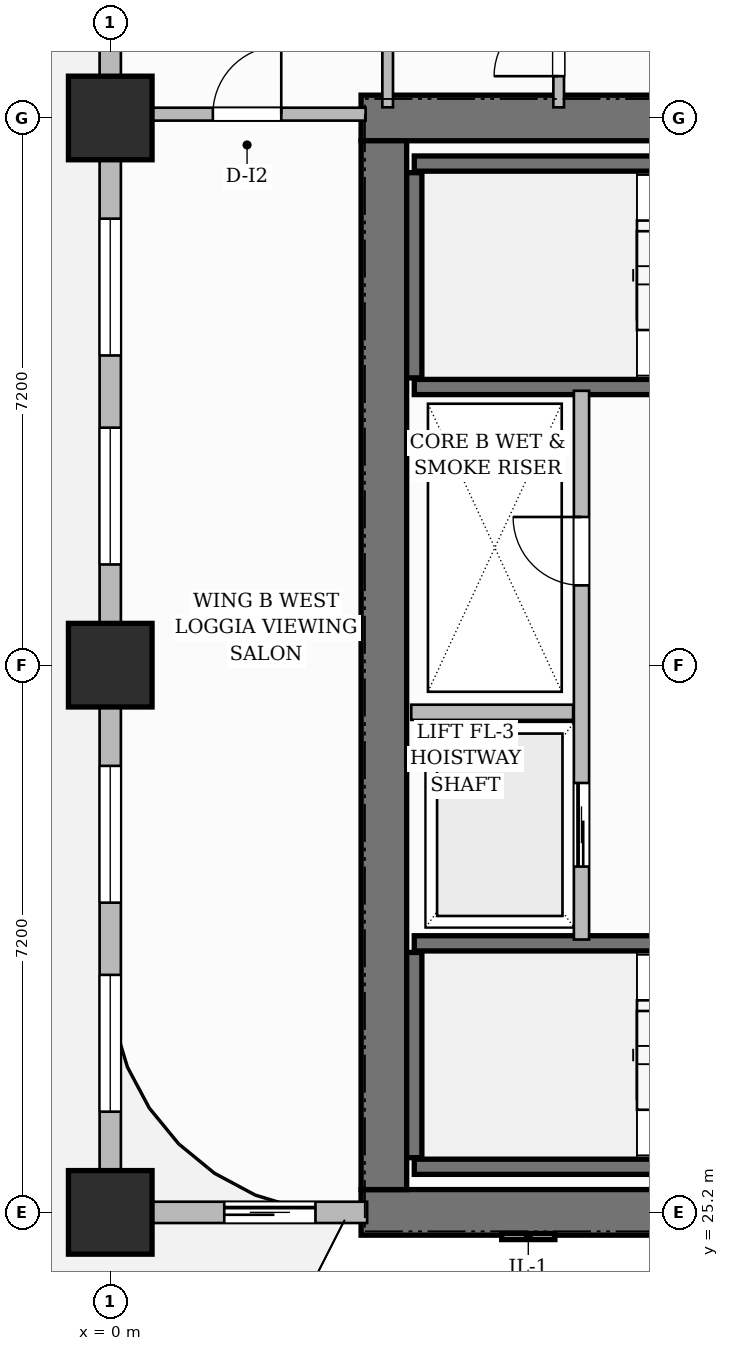
"""IFC4 building model, lengths in metres.
Left out: names, types, materials, properties, quantities, classifications, styles, units other than length and angle.
Written with IfcOpenShell. Run it as: python <this file> out.ifc"""

import sys

from ifc_helpers import new_model, si_unit, direction, frame, frame_2d, origin, origin_2d, place, context, subcontext, project, spatial, rectangle, extrude, source, transform, mapped, element, fill, save


model = new_model("IFC4")
c1 = context("Model", 3, precision=1e-05, world=origin(), true_north=direction((0.0, 1.0)))
c2 = subcontext(c1, "Body", "Model", "MODEL_VIEW")
j1 = project(units=[si_unit("LENGTHUNIT", "METRE"), si_unit("PLANEANGLEUNIT", "RADIAN")], contexts=[c1])
p1 = place(None, origin())
s1 = spatial("IfcSite", under=j1, at=p1, CompositionType="ELEMENT")
p2 = place(p1, origin())
s2 = spatial("IfcBuilding", under=s1, at=p2, CompositionType="ELEMENT")
p3 = place(p2, frame((0.0, 0.0, 36.1)))
s3 = spatial("IfcBuildingStorey", under=s2, at=p3, CompositionType="ELEMENT", Elevation=36.1)
for number, where, z_axis, x_axis in (
    (1, (3.3, 25.2, 0.0), (0.0, 0.0, 1.0), (1.0, 0.0, 0.0)),
    (2, (3.3, 39.6, 0.0), (0.0, 0.0, 1.0), (1.0, 0.0, 0.0)),
):
    element("IfcWall", number, at=place(p3, frame(where, z_axis=z_axis, x_axis=x_axis)), inside=s3, PredefinedType="SHEAR", context=c2, shape_type="SweptSolid", body=[
        extrude(rectangle(XDim=8.4, YDim=0.6, at=frame_2d((4.2, 0.0))), origin(), (0.0, 0.0, 1.0), 3.7),
    ])
p4 = place(p3, frame((3.6, 25.5, 0.0), z_axis=(0.0, 0.0, 1.0), x_axis=(0.0, 1.0, 0.0)))
e3 = element("IfcWall", 3, at=p4, inside=s3, PredefinedType="SHEAR", context=c2, shape_type="SweptSolid", body=[
    extrude(rectangle(XDim=13.8, YDim=0.6, at=frame_2d((6.9, 0.0))), origin(), (0.0, 0.0, 1.0), 3.7),
])
m1 = source(origin(), c2, "Body", "SweptSolid", [
    extrude(rectangle(XDim=1.1, YDim=1.1, at=origin_2d()), origin(), (0.0, 0.0, 1.0), 3.7),
])
for number, where, z_axis, x_axis in (
    (4, (0.0, 25.2, 0.0), (0.0, 0.0, 1.0), (1.0, 0.0, 0.0)),
    (5, (0.0, 32.4, 0.0), (0.0, 0.0, 1.0), (1.0, 0.0, 0.0)),
    (6, (0.0, 39.6, 0.0), (0.0, 0.0, 1.0), (1.0, 0.0, 0.0)),
):
    element("IfcColumn", number, at=place(p3, frame(where, z_axis=z_axis, x_axis=x_axis)), inside=s3, PredefinedType="COLUMN", context=c2, shape_type="MappedRepresentation", body=[
        mapped(m1, transform((0.0, 0.0, 0.0), scale=1.0)),
    ])
p5 = place(p3, frame((4.0, 25.8, 0.0), z_axis=(0.0, 0.0, 1.0), x_axis=(1.0, 0.0, 0.0)))
e7 = element("IfcWall", 7, at=p5, inside=s3, PredefinedType="SHEAR", context=c2, shape_type="SweptSolid", body=[
    extrude(rectangle(XDim=7.1, YDim=0.2, at=frame_2d((3.55, 0.0))), origin(), (0.0, 0.0, 1.0), 3.7),
])
p6 = place(p3, frame((4.0, 25.92, 0.0), z_axis=(0.0, 0.0, 1.0), x_axis=(0.0, 1.0, 0.0)))
e8 = element("IfcWall", 8, at=p6, inside=s3, PredefinedType="SHEAR", context=c2, shape_type="SweptSolid", body=[
    extrude(rectangle(XDim=2.7, YDim=0.2, at=frame_2d((1.35, 0.0))), origin(), (0.0, 0.0, 1.0), 3.7),
])
p7 = place(p3, frame((4.0, 28.74, 0.0), z_axis=(0.0, 0.0, 1.0), x_axis=(1.0, 0.0, 0.0)))
e9 = element("IfcWall", 9, at=p7, inside=s3, PredefinedType="SHEAR", context=c2, shape_type="SweptSolid", body=[
    extrude(rectangle(XDim=7.1, YDim=0.2, at=frame_2d((3.55, 0.0))), origin(), (0.0, 0.0, 1.0), 3.7),
])
p8 = place(p7, frame((5.815, 0.0, 0.0)))
e10 = element("IfcOpeningElement", 10, at=p8, cuts=e9, PredefinedType="OPENING", context=c2, shape_type="SweptSolid", body=[
    extrude(rectangle(XDim=1.05, YDim=2.2, at=frame_2d((0.525, 1.1))), frame((0.0, 0.11, 0.0), z_axis=(0.0, -1.0, 0.0), x_axis=(1.0, 0.0, 0.0)), (0.0, 0.0, 1.0), 0.22),
])
p9 = place(p3, frame((4.0, 39.0, 0.0), z_axis=(0.0, 0.0, 1.0), x_axis=(1.0, 0.0, 0.0)))
e11 = element("IfcWall", 11, at=p9, inside=s3, PredefinedType="SHEAR", context=c2, shape_type="SweptSolid", body=[
    extrude(rectangle(XDim=7.1, YDim=0.2, at=frame_2d((3.55, 0.0))), origin(), (0.0, 0.0, 1.0), 3.7),
])
p10 = place(p3, frame((4.0, 36.18, 0.0), z_axis=(0.0, 0.0, 1.0), x_axis=(0.0, 1.0, 0.0)))
e12 = element("IfcWall", 12, at=p10, inside=s3, PredefinedType="SHEAR", context=c2, shape_type="SweptSolid", body=[
    extrude(rectangle(XDim=2.7, YDim=0.2, at=frame_2d((1.35, 0.0))), origin(), (0.0, 0.0, 1.0), 3.7),
])
p11 = place(p3, frame((4.0, 36.06, 0.0), z_axis=(0.0, 0.0, 1.0), x_axis=(1.0, 0.0, 0.0)))
e13 = element("IfcWall", 13, at=p11, inside=s3, PredefinedType="SHEAR", context=c2, shape_type="SweptSolid", body=[
    extrude(rectangle(XDim=7.1, YDim=0.2, at=frame_2d((3.55, 0.0))), origin(), (0.0, 0.0, 1.0), 3.7),
])
p12 = place(p11, frame((5.815, 0.0, 0.0)))
e14 = element("IfcOpeningElement", 14, at=p12, cuts=e13, PredefinedType="OPENING", context=c2, shape_type="SweptSolid", body=[
    extrude(rectangle(XDim=1.05, YDim=2.2, at=frame_2d((0.525, 1.1))), frame((0.0, 0.11, 0.0), z_axis=(0.0, -1.0, 0.0), x_axis=(1.0, 0.0, 0.0)), (0.0, 0.0, 1.0), 0.22),
])
p13 = place(p3, frame((6.2, 28.79, 0.0), z_axis=(0.0, 0.0, 1.0), x_axis=(0.0, 1.0, 0.0)))
e15 = element("IfcWall", 15, at=p13, inside=s3, PredefinedType="PARTITIONING", context=c2, shape_type="SweptSolid", body=[
    extrude(rectangle(XDim=7.22, YDim=0.2, at=frame_2d((3.61, 0.0))), origin(), (0.0, 0.0, 1.0), 3.45),
])
p14 = place(p13, frame((4.66, 0.0, 0.0)))
e16 = element("IfcOpeningElement", 16, at=p14, cuts=e15, PredefinedType="OPENING", context=c2, shape_type="SweptSolid", body=[
    extrude(rectangle(XDim=0.9, YDim=2.1, at=frame_2d((0.45, 1.05))), frame((0.0, 0.11, 0.0), z_axis=(0.0, -1.0, 0.0), x_axis=(1.0, 0.0, 0.0)), (0.0, 0.0, 1.0), 0.22),
])
p15 = place(p13, frame((0.96, 0.0, 0.0)))
e17 = element("IfcOpeningElement", 17, at=p15, cuts=e15, PredefinedType="OPENING", context=c2, shape_type="SweptSolid", body=[
    extrude(rectangle(XDim=1.1, YDim=2.2, at=frame_2d((0.55, 1.1))), frame((0.0, 0.11, 0.0), z_axis=(0.0, -1.0, 0.0), x_axis=(1.0, 0.0, 0.0)), (0.0, 0.0, 1.0), 0.22),
])
p16 = place(p3, frame((3.96, 31.78, 0.0), z_axis=(0.0, 0.0, 1.0), x_axis=(1.0, 0.0, 0.0)))
e18 = element("IfcWall", 18, at=p16, inside=s3, PredefinedType="PARTITIONING", context=c2, shape_type="SweptSolid", body=[
    extrude(rectangle(XDim=2.13, YDim=0.2, at=frame_2d((1.065, 0.0))), origin(), (0.0, 0.0, 1.0), 3.45),
])
p17 = place(p3, frame((0.24, 39.65, 0.0), z_axis=(0.0, 0.0, 1.0), x_axis=(1.0, 0.0, 0.0)))
e19 = element("IfcWall", 19, at=p17, inside=s3, PredefinedType="PARTITIONING", context=c2, shape_type="SweptSolid", body=[
    extrude(rectangle(XDim=3.12, YDim=0.17, at=frame_2d((1.56, 0.0))), origin(), (0.0, 0.0, 1.0), 3.45),
])
p18 = place(p17, frame((1.11, 0.0, 0.0)))
e20 = element("IfcOpeningElement", 20, at=p18, cuts=e19, PredefinedType="OPENING", context=c2, shape_type="SweptSolid", body=[
    extrude(rectangle(XDim=0.9, YDim=2.15, at=frame_2d((0.45, 1.075))), frame((0.0, 0.095, 0.0), z_axis=(0.0, -1.0, 0.0), x_axis=(1.0, 0.0, 0.0)), (0.0, 0.0, 1.0), 0.19),
])
p19 = place(p3, frame((3.65, 39.74, 0.0), z_axis=(0.0, 0.0, 1.0), x_axis=(0.0, 1.0, 0.0)))
e21 = element("IfcWall", 21, at=p19, inside=s3, PredefinedType="PARTITIONING", context=c2, shape_type="SweptSolid", body=[
    extrude(rectangle(XDim=1.67, YDim=0.14, at=frame_2d((0.835, 0.0))), origin(), (0.0, 0.0, 1.0), 3.45),
])
p20 = place(p3, frame((5.9, 39.74, 0.0), z_axis=(0.0, 0.0, 1.0), x_axis=(0.0, 1.0, 0.0)))
e22 = element("IfcWall", 22, at=p20, inside=s3, PredefinedType="PARTITIONING", context=c2, shape_type="SweptSolid", body=[
    extrude(rectangle(XDim=1.67, YDim=0.14, at=frame_2d((0.835, 0.0))), origin(), (0.0, 0.0, 1.0), 3.45),
])
p21 = place(p20, frame((0.41, 0.0, 0.0)))
e23 = element("IfcOpeningElement", 23, at=p21, cuts=e22, PredefinedType="OPENING", context=c2, shape_type="SweptSolid", body=[
    extrude(rectangle(XDim=0.85, YDim=2.1, at=frame_2d((0.425, 1.05))), frame((0.0, 0.08, 0.0), z_axis=(0.0, -1.0, 0.0), x_axis=(1.0, 0.0, 0.0)), (0.0, 0.0, 1.0), 0.16),
])
p22 = place(p3, frame((0.0, 25.2, 0.0), z_axis=(0.0, 0.0, 1.0), x_axis=(1.0, 0.0, 0.0)))
e24 = element("IfcWall", 24, at=p22, inside=s3, PredefinedType="SOLIDWALL", context=c2, shape_type="SweptSolid", body=[
    extrude(rectangle(XDim=3.38, YDim=0.28, at=frame_2d((1.69, 0.0))), origin(), (0.0, 0.0, 1.0), 3.45),
])
p23 = place(p22, frame((1.5, 0.0, 0.0)))
e25 = element("IfcOpeningElement", 25, at=p23, cuts=e24, PredefinedType="OPENING", context=c2, shape_type="SweptSolid", body=[
    extrude(rectangle(XDim=1.2, YDim=2.2, at=frame_2d((0.6, 1.1))), frame((0.0, 0.15, 0.0), z_axis=(0.0, -1.0, 0.0), x_axis=(1.0, 0.0, 0.0)), (0.0, 0.0, 1.0), 0.3),
])
p24 = place(p3, frame((0.0, 25.25, 0.0), z_axis=(0.0, 0.0, 1.0), x_axis=(0.0, 1.0, 0.0)))
e26 = element("IfcWall", 26, at=p24, inside=s3, PredefinedType="SOLIDWALL", context=c2, shape_type="SweptSolid", body=[
    extrude(rectangle(XDim=21.5, YDim=0.28, at=frame_2d((10.75, 0.0))), origin(), (0.0, 0.0, 1.0), 2.885),
])
p25 = place(p24, frame((1.275, 0.0, 0.8)))
e27 = element("IfcOpeningElement", 27, at=p25, cuts=e26, PredefinedType="OPENING", context=c2, shape_type="SweptSolid", body=[
    extrude(rectangle(XDim=1.8, YDim=1.85, at=frame_2d((0.9, 0.925))), frame((0.0, 0.15, 0.0), z_axis=(0.0, -1.0, 0.0), x_axis=(1.0, 0.0, 0.0)), (0.0, 0.0, 1.0), 0.3),
])
p26 = place(p24, frame((4.025, 0.0, 0.8)))
e28 = element("IfcOpeningElement", 28, at=p26, cuts=e26, PredefinedType="OPENING", context=c2, shape_type="SweptSolid", body=[
    extrude(rectangle(XDim=1.8, YDim=1.85, at=frame_2d((0.9, 0.925))), frame((0.0, 0.15, 0.0), z_axis=(0.0, -1.0, 0.0), x_axis=(1.0, 0.0, 0.0)), (0.0, 0.0, 1.0), 0.3),
])
p27 = place(p24, frame((8.475, 0.0, 0.8)))
e29 = element("IfcOpeningElement", 29, at=p27, cuts=e26, PredefinedType="OPENING", context=c2, shape_type="SweptSolid", body=[
    extrude(rectangle(XDim=1.8, YDim=1.85, at=frame_2d((0.9, 0.925))), frame((0.0, 0.15, 0.0), z_axis=(0.0, -1.0, 0.0), x_axis=(1.0, 0.0, 0.0)), (0.0, 0.0, 1.0), 0.3),
])
p28 = place(p24, frame((11.225, 0.0, 0.8)))
e30 = element("IfcOpeningElement", 30, at=p28, cuts=e26, PredefinedType="OPENING", context=c2, shape_type="SweptSolid", body=[
    extrude(rectangle(XDim=1.8, YDim=1.85, at=frame_2d((0.9, 0.925))), frame((0.0, 0.15, 0.0), z_axis=(0.0, -1.0, 0.0), x_axis=(1.0, 0.0, 0.0)), (0.0, 0.0, 1.0), 0.3),
])
p29 = place(p24, frame((15.697, 0.0, 0.8)))
e31 = element("IfcOpeningElement", 31, at=p29, cuts=e26, PredefinedType="OPENING", context=c2, shape_type="SweptSolid", body=[
    extrude(rectangle(XDim=1.4, YDim=1.85, at=frame_2d((0.7, 0.925))), frame((0.0, 0.15, 0.0), z_axis=(0.0, -1.0, 0.0), x_axis=(1.0, 0.0, 0.0)), (0.0, 0.0, 1.0), 0.3),
])
p30 = place(p24, frame((18.303, 0.0, 0.8)))
e32 = element("IfcOpeningElement", 32, at=p30, cuts=e26, PredefinedType="OPENING", context=c2, shape_type="SweptSolid", body=[
    extrude(rectangle(XDim=1.8, YDim=1.85, at=frame_2d((0.9, 0.925))), frame((0.0, 0.15, 0.0), z_axis=(0.0, -1.0, 0.0), x_axis=(1.0, 0.0, 0.0)), (0.0, 0.0, 1.0), 0.3),
])
m2 = source(origin(), c2, "Body", "SweptSolid", [
    extrude(rectangle(XDim=0.9, YDim=2.1, at=frame_2d((0.45, 1.05))), frame((0.0, 0.025, 0.0), z_axis=(0.0, -1.0, 0.0), x_axis=(1.0, 0.0, 0.0)), (0.0, 0.0, 1.0), 0.05),
])
p31 = place(p14, origin())
e33 = element("IfcDoor", 33, at=p31, inside=s3, OperationType="SINGLE_SWING_RIGHT", PredefinedType="DOOR", context=c2, shape_type="MappedRepresentation", body=[
    mapped(m2, transform((0.0, 0.0, 0.0), scale=1.0)),
])
fill(e16, e33)
m3 = source(origin(), c2, "Body", "SweptSolid", [
    extrude(rectangle(XDim=0.9, YDim=2.15, at=frame_2d((0.45, 1.075))), frame((0.0, 0.025, 0.0), z_axis=(0.0, -1.0, 0.0), x_axis=(1.0, 0.0, 0.0)), (0.0, 0.0, 1.0), 0.05),
])
p32 = place(p18, origin())
e34 = element("IfcDoor", 34, at=p32, inside=s3, OperationType="SINGLE_SWING_RIGHT", PredefinedType="DOOR", context=c2, shape_type="MappedRepresentation", body=[
    mapped(m3, transform((0.0, 0.0, 0.0), scale=1.0)),
])
fill(e20, e34)
m4 = source(origin(), c2, "Body", "SweptSolid", [
    extrude(rectangle(XDim=0.85, YDim=2.1, at=frame_2d((0.425, 1.05))), frame((0.0, 0.025, 0.0), z_axis=(0.0, -1.0, 0.0), x_axis=(1.0, 0.0, 0.0)), (0.0, 0.0, 1.0), 0.05),
])
p33 = place(p21, origin())
e35 = element("IfcDoor", 35, at=p33, inside=s3, OperationType="SINGLE_SWING_LEFT", PredefinedType="DOOR", context=c2, shape_type="MappedRepresentation", body=[
    mapped(m4, transform((0.0, 0.0, 0.0), scale=1.0)),
])
fill(e23, e35)
m5 = source(origin(), c2, "Body", "SweptSolid", [
    extrude(rectangle(XDim=1.1, YDim=2.2, at=frame_2d((0.55, 1.1))), frame((0.0, 0.025, 0.0), z_axis=(0.0, -1.0, 0.0), x_axis=(1.0, 0.0, 0.0)), (0.0, 0.0, 1.0), 0.05),
])
p34 = place(p15, origin())
e36 = element("IfcDoor", 36, at=p34, inside=s3, OperationType="SLIDING_TO_LEFT", PredefinedType="DOOR", context=c2, shape_type="MappedRepresentation", body=[
    mapped(m5, transform((0.0, 0.0, 0.0), scale=1.0)),
])
fill(e17, e36)
m6 = source(origin(), c2, "Body", "SweptSolid", [
    extrude(rectangle(XDim=1.2, YDim=2.2, at=frame_2d((0.6, 1.1))), frame((0.0, 0.025, 0.0), z_axis=(0.0, -1.0, 0.0), x_axis=(1.0, 0.0, 0.0)), (0.0, 0.0, 1.0), 0.05),
])
p35 = place(p23, origin())
e37 = element("IfcDoor", 37, at=p35, inside=s3, OperationType="SLIDING_TO_LEFT", PredefinedType="DOOR", context=c2, shape_type="MappedRepresentation", body=[
    mapped(m6, transform((0.0, 0.0, 0.0), scale=1.0)),
])
fill(e25, e37)
m7 = source(origin(), c2, "Body", "SweptSolid", [
    extrude(rectangle(XDim=1.8, YDim=1.85, at=frame_2d((0.9, 0.925))), frame((0.0, 0.03, 0.0), z_axis=(0.0, -1.0, 0.0), x_axis=(1.0, 0.0, 0.0)), (0.0, 0.0, 1.0), 0.06),
])
p36 = place(p25, origin())
e38 = element("IfcWindow", 38, at=p36, inside=s3, PartitioningType="DOUBLE_PANEL_VERTICAL", PredefinedType="WINDOW", context=c2, shape_type="MappedRepresentation", body=[
    mapped(m7, transform((0.0, 0.0, 0.0), scale=1.0)),
])
fill(e27, e38)
p37 = place(p26, origin())
e39 = element("IfcWindow", 39, at=p37, inside=s3, PartitioningType="DOUBLE_PANEL_VERTICAL", PredefinedType="WINDOW", context=c2, shape_type="MappedRepresentation", body=[
    mapped(m7, transform((0.0, 0.0, 0.0), scale=1.0)),
])
fill(e28, e39)
p38 = place(p27, origin())
e40 = element("IfcWindow", 40, at=p38, inside=s3, PartitioningType="DOUBLE_PANEL_VERTICAL", PredefinedType="WINDOW", context=c2, shape_type="MappedRepresentation", body=[
    mapped(m7, transform((0.0, 0.0, 0.0), scale=1.0)),
])
fill(e29, e40)
p39 = place(p28, origin())
e41 = element("IfcWindow", 41, at=p39, inside=s3, PartitioningType="DOUBLE_PANEL_VERTICAL", PredefinedType="WINDOW", context=c2, shape_type="MappedRepresentation", body=[
    mapped(m7, transform((0.0, 0.0, 0.0), scale=1.0)),
])
fill(e30, e41)
save(model, sys.argv[1])
